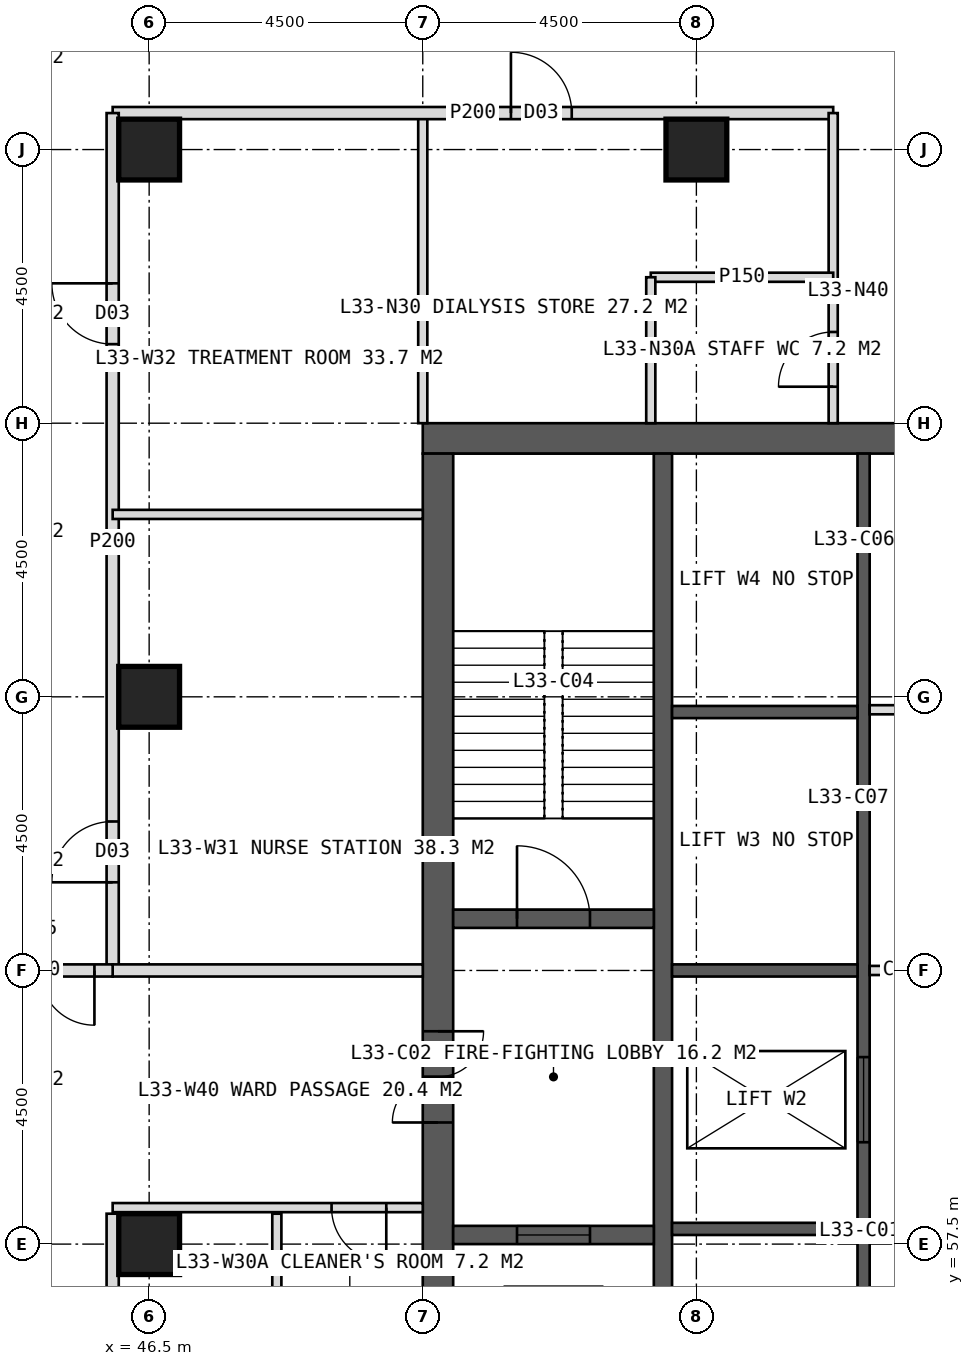
"""IFC4 building model, lengths in metres.
Left out: names, types, materials, properties, quantities, classifications, styles, units other than length and angle.
Written with IfcOpenShell. Run it as: python <this file> out.ifc"""

import sys

from ifc_helpers import new_model, si_unit, direction, frame, frame_2d, origin, origin_2d, place, context, subcontext, project, spatial, rectangle, hollow_rectangle, extrude, element, fill, save


model = new_model("IFC4")
c1 = context("Model", 3, precision=1e-05, world=origin(), true_north=direction((0.0, 1.0)))
c2 = subcontext(c1, "Body", "Model", "MODEL_VIEW")
j1 = project(units=[si_unit("LENGTHUNIT", "METRE"), si_unit("PLANEANGLEUNIT", "RADIAN")], contexts=[c1])
p1 = place(None, origin())
s1 = spatial("IfcSite", under=j1, at=p1, CompositionType="ELEMENT")
p2 = place(p1, origin())
s2 = spatial("IfcBuilding", under=s1, at=p2, CompositionType="ELEMENT")
p3 = place(p2, frame((0.0, 0.0, 140.0)))
s3 = spatial("IfcBuildingStorey", under=s2, at=p3, CompositionType="ELEMENT", Elevation=140.0)
p4 = place(p3, frame((51.0, 70.75, 0.0), z_axis=(0.0, 0.0, 1.0), x_axis=(1.0, 0.0, 0.0)))
e1 = element("IfcWall", 1, at=p4, inside=s3, PredefinedType="SHEAR", context=c2, shape_type="SweptSolid", body=[
    extrude(rectangle(XDim=18.0, YDim=0.5, at=frame_2d((9.0, 0.0))), origin(), (0.0, 0.0, 1.0), 4.0),
])
p5 = place(p4, frame((8.1, 0.0, 0.0)))
e2 = element("IfcOpeningElement", 2, at=p5, cuts=e1, PredefinedType="OPENING", context=c2, shape_type="SweptSolid", body=[
    extrude(rectangle(XDim=1.8, YDim=2.2, at=frame_2d((0.9, 1.1))), frame((0.0, 0.26, 0.0), z_axis=(0.0, -1.0, 0.0), x_axis=(1.0, 0.0, 0.0)), (0.0, 0.0, 1.0), 0.52),
])
p6 = place(p3, frame((51.25, 53.5, 0.0), z_axis=(0.0, 0.0, 1.0), x_axis=(0.0, 1.0, 0.0)))
e3 = element("IfcWall", 3, at=p6, inside=s3, PredefinedType="SHEAR", context=c2, shape_type="SweptSolid", body=[
    extrude(rectangle(XDim=17.0, YDim=0.5, at=frame_2d((8.5, 0.0))), origin(), (0.0, 0.0, 1.0), 4.0),
])
p7 = place(p6, frame((6.0, 0.0, 0.0)))
e4 = element("IfcOpeningElement", 4, at=p7, cuts=e3, PredefinedType="OPENING", context=c2, shape_type="SweptSolid", body=[
    extrude(rectangle(XDim=1.5, YDim=2.2, at=frame_2d((0.75, 1.1))), frame((0.0, 0.26, 0.0), z_axis=(0.0, -1.0, 0.0), x_axis=(1.0, 0.0, 0.0)), (0.0, 0.0, 1.0), 0.52),
])
p8 = place(p3, frame((54.95, 53.5, 0.0), z_axis=(0.0, 0.0, 1.0), x_axis=(0.0, 1.0, 0.0)))
e5 = element("IfcWall", 5, at=p8, inside=s3, PredefinedType="SHEAR", context=c2, shape_type="SweptSolid", body=[
    extrude(rectangle(XDim=17.0, YDim=0.3, at=frame_2d((8.5, 0.0))), origin(), (0.0, 0.0, 1.0), 4.0),
])
p9 = place(p3, frame((58.25, 53.5, 0.0), z_axis=(0.0, 0.0, 1.0), x_axis=(0.0, 1.0, 0.0)))
e6 = element("IfcWall", 6, at=p9, inside=s3, PredefinedType="SHEAR", context=c2, shape_type="SweptSolid", body=[
    extrude(rectangle(XDim=17.0, YDim=0.2, at=frame_2d((8.5, 0.0))), origin(), (0.0, 0.0, 1.0), 4.0),
])
p10 = place(p9, frame((1.375, 0.0, 0.0)))
e7 = element("IfcOpeningElement", 7, at=p10, cuts=e6, PredefinedType="OPENING", context=c2, shape_type="SweptSolid", body=[
    extrude(rectangle(XDim=1.4, YDim=2.2, at=frame_2d((0.7, 1.1))), frame((0.0, 0.11, 0.0), z_axis=(0.0, -1.0, 0.0), x_axis=(1.0, 0.0, 0.0)), (0.0, 0.0, 1.0), 0.22),
])
p11 = place(p9, frame((5.675, 0.0, 0.0)))
e8 = element("IfcOpeningElement", 8, at=p11, cuts=e6, PredefinedType="OPENING", context=c2, shape_type="SweptSolid", body=[
    extrude(rectangle(XDim=1.4, YDim=2.2, at=frame_2d((0.7, 1.1))), frame((0.0, 0.11, 0.0), z_axis=(0.0, -1.0, 0.0), x_axis=(1.0, 0.0, 0.0)), (0.0, 0.0, 1.0), 0.22),
])
for number, where, z_axis, x_axis in (
    (9, (55.1, 57.75, 0.0), (0.0, 0.0, 1.0), (1.0, 0.0, 0.0)),
    (10, (55.1, 62.0, 0.0), (0.0, 0.0, 1.0), (1.0, 0.0, 0.0)),
    (11, (55.1, 66.25, 0.0), (0.0, 0.0, 1.0), (1.0, 0.0, 0.0)),
):
    element("IfcWall", number, at=place(p3, frame(where, z_axis=z_axis, x_axis=x_axis)), inside=s3, PredefinedType="SHEAR", context=c2, shape_type="SweptSolid", body=[
        extrude(rectangle(XDim=3.05, YDim=0.2, at=frame_2d((1.525, 0.0))), origin(), (0.0, 0.0, 1.0), 4.0),
    ])
p12 = place(p3, frame((51.5, 62.85, 0.0), z_axis=(0.0, 0.0, 1.0), x_axis=(1.0, 0.0, 0.0)))
e12 = element("IfcWall", 12, at=p12, inside=s3, PredefinedType="SHEAR", context=c2, shape_type="SweptSolid", body=[
    extrude(rectangle(XDim=3.3, YDim=0.3, at=frame_2d((1.65, 0.0))), origin(), (0.0, 0.0, 1.0), 4.0),
])
p13 = place(p12, frame((1.05, 0.0, 0.0)))
e13 = element("IfcOpeningElement", 13, at=p13, cuts=e12, PredefinedType="OPENING", context=c2, shape_type="SweptSolid", body=[
    extrude(rectangle(XDim=1.2, YDim=2.1, at=frame_2d((0.6, 1.05))), frame((0.0, 0.16, 0.0), z_axis=(0.0, -1.0, 0.0), x_axis=(1.0, 0.0, 0.0)), (0.0, 0.0, 1.0), 0.32),
])
p14 = place(p3, frame((51.5, 57.65, 0.0), z_axis=(0.0, 0.0, 1.0), x_axis=(1.0, 0.0, 0.0)))
e14 = element("IfcWall", 14, at=p14, inside=s3, PredefinedType="SHEAR", context=c2, shape_type="SweptSolid", body=[
    extrude(rectangle(XDim=3.3, YDim=0.3, at=frame_2d((1.65, 0.0))), origin(), (0.0, 0.0, 1.0), 4.0),
])
p15 = place(p14, frame((1.05, 0.0, 0.0)))
e15 = element("IfcOpeningElement", 15, at=p15, cuts=e14, PredefinedType="OPENING", context=c2, shape_type="SweptSolid", body=[
    extrude(rectangle(XDim=1.2, YDim=2.2, at=frame_2d((0.6, 1.1))), frame((0.0, 0.16, 0.0), z_axis=(0.0, -1.0, 0.0), x_axis=(1.0, 0.0, 0.0)), (0.0, 0.0, 1.0), 0.32),
])
for number, where, z_axis, x_axis in (
    (16, (46.5, 75.5, 0.0), (0.0, 0.0, 1.0), (1.0, 0.0, 0.0)),
    (17, (55.5, 75.5, 0.0), (0.0, 0.0, 1.0), (1.0, 0.0, 0.0)),
    (18, (46.5, 57.5, 0.0), (0.0, 0.0, 1.0), (1.0, 0.0, 0.0)),
    (19, (46.5, 66.5, 0.0), (0.0, 0.0, 1.0), (1.0, 0.0, 0.0)),
):
    element("IfcColumn", number, at=place(p3, frame(where, z_axis=z_axis, x_axis=x_axis)), inside=s3, PredefinedType="COLUMN", context=c2, shape_type="SweptSolid", body=[
        extrude(hollow_rectangle(XDim=1.0, YDim=1.0, WallThickness=0.1, at=origin_2d()), origin(), (0.0, 0.0, 1.0), 4.0),
    ])
p16 = place(p3, frame((51.0, 71.0, 0.0), z_axis=(0.0, 0.0, 1.0), x_axis=(0.0, 1.0, 0.0)))
e20 = element("IfcWall", 20, at=p16, inside=s3, PredefinedType="PARTITIONING", context=c2, shape_type="SweptSolid", body=[
    extrude(rectangle(XDim=5.1, YDim=0.15, at=frame_2d((2.55, 0.0))), origin(), (0.0, 0.0, 1.0), 3.75),
])
p17 = place(p3, frame((45.9, 76.1, 0.0), z_axis=(0.0, 0.0, 1.0), x_axis=(1.0, 0.0, 0.0)))
e21 = element("IfcWall", 21, at=p17, inside=s3, PredefinedType="PARTITIONING", context=c2, shape_type="SweptSolid", body=[
    extrude(rectangle(XDim=11.85, YDim=0.2, at=frame_2d((5.925, 0.0))), origin(), (0.0, 0.0, 1.0), 3.75),
])
p18 = place(p17, frame((6.55, 0.0, 0.0)))
e22 = element("IfcOpeningElement", 22, at=p18, cuts=e21, PredefinedType="OPENING", context=c2, shape_type="SweptSolid", body=[
    extrude(rectangle(XDim=1.0, YDim=2.1, at=frame_2d((0.5, 1.05))), frame((0.0, 0.11, 0.0), z_axis=(0.0, -1.0, 0.0), x_axis=(1.0, 0.0, 0.0)), (0.0, 0.0, 1.0), 0.22),
])
p19 = place(p3, frame((57.75, 71.0, 0.0), z_axis=(0.0, 0.0, 1.0), x_axis=(0.0, 1.0, 0.0)))
e23 = element("IfcWall", 23, at=p19, inside=s3, PredefinedType="PARTITIONING", context=c2, shape_type="SweptSolid", body=[
    extrude(rectangle(XDim=5.1, YDim=0.15, at=frame_2d((2.55, 0.0))), origin(), (0.0, 0.0, 1.0), 3.75),
])
p20 = place(p19, frame((0.6, 0.0, 0.0)))
e24 = element("IfcOpeningElement", 24, at=p20, cuts=e23, PredefinedType="OPENING", context=c2, shape_type="SweptSolid", body=[
    extrude(rectangle(XDim=0.9, YDim=2.1, at=frame_2d((0.45, 1.05))), frame((0.0, 0.085, 0.0), z_axis=(0.0, -1.0, 0.0), x_axis=(1.0, 0.0, 0.0)), (0.0, 0.0, 1.0), 0.17),
])
p21 = place(p3, frame((54.75, 73.4, 0.0), z_axis=(0.0, 0.0, 1.0), x_axis=(1.0, 0.0, 0.0)))
e25 = element("IfcWall", 25, at=p21, inside=s3, PredefinedType="PARTITIONING", context=c2, shape_type="SweptSolid", body=[
    extrude(rectangle(XDim=3.0, YDim=0.15, at=frame_2d((1.5, 0.0))), origin(), (0.0, 0.0, 1.0), 3.75),
])
p22 = place(p3, frame((54.75, 71.0, 0.0), z_axis=(0.0, 0.0, 1.0), x_axis=(0.0, 1.0, 0.0)))
e26 = element("IfcWall", 26, at=p22, inside=s3, PredefinedType="PARTITIONING", context=c2, shape_type="SweptSolid", body=[
    extrude(rectangle(XDim=2.4, YDim=0.15, at=frame_2d((1.2, 0.0))), origin(), (0.0, 0.0, 1.0), 3.75),
])
p23 = place(p3, frame((45.9, 47.9, 0.0), z_axis=(0.0, 0.0, 1.0), x_axis=(0.0, 1.0, 0.0)))
e27 = element("IfcWall", 27, at=p23, inside=s3, PredefinedType="PARTITIONING", context=c2, shape_type="SweptSolid", body=[
    extrude(rectangle(XDim=10.1, YDim=0.2, at=frame_2d((5.05, 0.0))), origin(), (0.0, 0.0, 1.0), 3.75),
])
p24 = place(p23, frame((7.1, 0.0, 0.0)))
e28 = element("IfcOpeningElement", 28, at=p24, cuts=e27, PredefinedType="OPENING", context=c2, shape_type="SweptSolid", body=[
    extrude(rectangle(XDim=1.0, YDim=2.1, at=frame_2d((0.5, 1.05))), frame((0.0, 0.11, 0.0), z_axis=(0.0, -1.0, 0.0), x_axis=(1.0, 0.0, 0.0)), (0.0, 0.0, 1.0), 0.22),
])
p25 = place(p3, frame((45.9, 62.0, 0.0), z_axis=(0.0, 0.0, 1.0), x_axis=(0.0, 1.0, 0.0)))
e29 = element("IfcWall", 29, at=p25, inside=s3, PredefinedType="PARTITIONING", context=c2, shape_type="SweptSolid", body=[
    extrude(rectangle(XDim=14.1, YDim=0.2, at=frame_2d((7.05, 0.0))), origin(), (0.0, 0.0, 1.0), 3.75),
])
p26 = place(p25, frame((1.45, 0.0, 0.0)))
e30 = element("IfcOpeningElement", 30, at=p26, cuts=e29, PredefinedType="OPENING", context=c2, shape_type="SweptSolid", body=[
    extrude(rectangle(XDim=1.0, YDim=2.1, at=frame_2d((0.5, 1.05))), frame((0.0, 0.11, 0.0), z_axis=(0.0, -1.0, 0.0), x_axis=(1.0, 0.0, 0.0)), (0.0, 0.0, 1.0), 0.22),
])
p27 = place(p25, frame((10.3, 0.0, 0.0)))
e31 = element("IfcOpeningElement", 31, at=p27, cuts=e29, PredefinedType="OPENING", context=c2, shape_type="SweptSolid", body=[
    extrude(rectangle(XDim=1.0, YDim=2.1, at=frame_2d((0.5, 1.05))), frame((0.0, 0.11, 0.0), z_axis=(0.0, -1.0, 0.0), x_axis=(1.0, 0.0, 0.0)), (0.0, 0.0, 1.0), 0.22),
])
p28 = place(p3, frame((51.0, 58.1, 0.0), z_axis=(0.0, 0.0, 1.0), x_axis=(-1.0, 0.0, 0.0)))
e32 = element("IfcWall", 32, at=p28, inside=s3, PredefinedType="PARTITIONING", context=c2, shape_type="SweptSolid", body=[
    extrude(rectangle(XDim=5.1, YDim=0.15, at=frame_2d((2.55, 0.0))), origin(), (0.0, 0.0, 1.0), 3.75),
])
p29 = place(p28, frame((0.6, 0.0, 0.0)))
e33 = element("IfcOpeningElement", 33, at=p29, cuts=e32, PredefinedType="OPENING", context=c2, shape_type="SweptSolid", body=[
    extrude(rectangle(XDim=0.9, YDim=2.1, at=frame_2d((0.45, 1.05))), frame((0.0, 0.085, 0.0), z_axis=(0.0, -1.0, 0.0), x_axis=(1.0, 0.0, 0.0)), (0.0, 0.0, 1.0), 0.17),
])
p30 = place(p3, frame((51.0, 62.0, 0.0), z_axis=(0.0, 0.0, 1.0), x_axis=(-1.0, 0.0, 0.0)))
e34 = element("IfcWall", 34, at=p30, inside=s3, PredefinedType="SOLIDWALL", context=c2, shape_type="SweptSolid", body=[
    extrude(rectangle(XDim=5.1, YDim=0.2, at=frame_2d((2.55, 0.0))), origin(), (0.0, 0.0, 1.0), 2.95),
])
p31 = place(p3, frame((51.0, 69.5, 0.0), z_axis=(0.0, 0.0, 1.0), x_axis=(-1.0, 0.0, 0.0)))
e35 = element("IfcWall", 35, at=p31, inside=s3, PredefinedType="PARTITIONING", context=c2, shape_type="SweptSolid", body=[
    extrude(rectangle(XDim=5.1, YDim=0.15, at=frame_2d((2.55, 0.0))), origin(), (0.0, 0.0, 1.0), 3.75),
])
p32 = place(p3, frame((48.6, 55.0, 0.0), z_axis=(0.0, 0.0, 1.0), x_axis=(0.0, 1.0, 0.0)))
e36 = element("IfcWall", 36, at=p32, inside=s3, PredefinedType="PARTITIONING", context=c2, shape_type="SweptSolid", body=[
    extrude(rectangle(XDim=3.0, YDim=0.15, at=frame_2d((1.5, 0.0))), origin(), (0.0, 0.0, 1.0), 3.75),
])
p33 = place(p3, frame((45.9, 62.0, 0.0), z_axis=(0.0, 0.0, 1.0), x_axis=(-1.0, 0.0, 0.0)))
e37 = element("IfcWall", 37, at=p33, inside=s3, PredefinedType="SOLIDWALL", context=c2, shape_type="SweptSolid", body=[
    extrude(rectangle(XDim=2.7, YDim=0.2, at=frame_2d((1.35, 0.0))), origin(), (0.0, 0.0, 1.0), 2.95),
])
p34 = place(p33, frame((0.3, 0.0, 0.0)))
e38 = element("IfcOpeningElement", 38, at=p34, cuts=e37, PredefinedType="OPENING", context=c2, shape_type="SweptSolid", body=[
    extrude(rectangle(XDim=1.8, YDim=2.2, at=frame_2d((0.9, 1.1))), frame((0.0, 0.11, 0.0), z_axis=(0.0, -1.0, 0.0), x_axis=(1.0, 0.0, 0.0)), (0.0, 0.0, 1.0), 0.22),
])
p35 = place(p3, frame((58.35, 62.0, 0.0), z_axis=(0.0, 0.0, 1.0), x_axis=(1.0, 0.0, 0.0)))
e39 = element("IfcWall", 39, at=p35, inside=s3, PredefinedType="PARTITIONING", context=c2, shape_type="SweptSolid", body=[
    extrude(rectangle(XDim=3.3, YDim=0.15, at=frame_2d((1.65, 0.0))), origin(), (0.0, 0.0, 1.0), 3.75),
])
p36 = place(p35, frame((1.15, 0.0, 0.0)))
e40 = element("IfcOpeningElement", 40, at=p36, cuts=e39, PredefinedType="OPENING", context=c2, shape_type="SweptSolid", body=[
    extrude(rectangle(XDim=1.0, YDim=2.1, at=frame_2d((0.5, 1.05))), frame((0.0, 0.085, 0.0), z_axis=(0.0, -1.0, 0.0), x_axis=(1.0, 0.0, 0.0)), (0.0, 0.0, 1.0), 0.17),
])
p37 = place(p3, frame((58.35, 66.288, 0.0), z_axis=(0.0, 0.0, 1.0), x_axis=(1.0, 0.0, 0.0)))
e41 = element("IfcWall", 41, at=p37, inside=s3, PredefinedType="PARTITIONING", context=c2, shape_type="SweptSolid", body=[
    extrude(rectangle(XDim=3.3, YDim=0.15, at=frame_2d((1.65, 0.0))), origin(), (0.0, 0.0, 1.0), 3.75),
])
p38 = place(p20, origin())
e42 = element("IfcDoor", 42, at=p38, inside=s3, OperationType="SINGLE_SWING_LEFT", PredefinedType="DOOR", context=c2, shape_type="SweptSolid", body=[
    extrude(rectangle(XDim=0.9, YDim=2.1, at=frame_2d((0.45, 1.05))), frame((0.0, 0.025, 0.0), z_axis=(0.0, -1.0, 0.0), x_axis=(1.0, 0.0, 0.0)), (0.0, 0.0, 1.0), 0.05),
])
fill(e24, e42)
p39 = place(p18, origin())
e43 = element("IfcDoor", 43, at=p39, inside=s3, OperationType="SINGLE_SWING_LEFT", PredefinedType="DOOR", context=c2, shape_type="SweptSolid", body=[
    extrude(rectangle(XDim=1.0, YDim=2.1, at=frame_2d((0.5, 1.05))), frame((0.0, 0.025, 0.0), z_axis=(0.0, -1.0, 0.0), x_axis=(1.0, 0.0, 0.0)), (0.0, 0.0, 1.0), 0.05),
])
fill(e22, e43)
p40 = place(p29, origin())
e44 = element("IfcDoor", 44, at=p40, inside=s3, OperationType="SINGLE_SWING_LEFT", PredefinedType="DOOR", context=c2, shape_type="SweptSolid", body=[
    extrude(rectangle(XDim=0.9, YDim=2.1, at=frame_2d((0.45, 1.05))), frame((0.0, 0.025, 0.0), z_axis=(0.0, -1.0, 0.0), x_axis=(1.0, 0.0, 0.0)), (0.0, 0.0, 1.0), 0.05),
])
fill(e33, e44)
p41 = place(p26, origin())
e45 = element("IfcDoor", 45, at=p41, inside=s3, OperationType="SINGLE_SWING_LEFT", PredefinedType="DOOR", context=c2, shape_type="SweptSolid", body=[
    extrude(rectangle(XDim=1.0, YDim=2.1, at=frame_2d((0.5, 1.05))), frame((0.0, 0.025, 0.0), z_axis=(0.0, -1.0, 0.0), x_axis=(1.0, 0.0, 0.0)), (0.0, 0.0, 1.0), 0.05),
])
fill(e30, e45)
p42 = place(p27, origin())
e46 = element("IfcDoor", 46, at=p42, inside=s3, OperationType="SINGLE_SWING_RIGHT", PredefinedType="DOOR", context=c2, shape_type="SweptSolid", body=[
    extrude(rectangle(XDim=1.0, YDim=2.1, at=frame_2d((0.5, 1.05))), frame((0.0, 0.025, 0.0), z_axis=(0.0, -1.0, 0.0), x_axis=(1.0, 0.0, 0.0)), (0.0, 0.0, 1.0), 0.05),
])
fill(e31, e46)
p43 = place(p34, origin())
e47 = element("IfcDoor", 47, at=p43, inside=s3, OperationType="DOUBLE_DOOR_DOUBLE_SWING", PredefinedType="DOOR", context=c2, shape_type="SweptSolid", body=[
    extrude(rectangle(XDim=1.8, YDim=2.2, at=frame_2d((0.9, 1.1))), frame((0.0, 0.025, 0.0), z_axis=(0.0, -1.0, 0.0), x_axis=(1.0, 0.0, 0.0)), (0.0, 0.0, 1.0), 0.05),
])
fill(e38, e47)
p44 = place(p7, origin())
e48 = element("IfcDoor", 48, at=p44, inside=s3, OperationType="DOUBLE_DOOR_SINGLE_SWING", PredefinedType="DOOR", context=c2, shape_type="SweptSolid", body=[
    extrude(rectangle(XDim=1.5, YDim=2.2, at=frame_2d((0.75, 1.1))), frame((0.0, 0.025, 0.0), z_axis=(0.0, -1.0, 0.0), x_axis=(1.0, 0.0, 0.0)), (0.0, 0.0, 1.0), 0.05),
])
fill(e4, e48)
p45 = place(p13, origin())
e49 = element("IfcDoor", 49, at=p45, inside=s3, OperationType="SINGLE_SWING_LEFT", PredefinedType="DOOR", context=c2, shape_type="SweptSolid", body=[
    extrude(rectangle(XDim=1.2, YDim=2.1, at=frame_2d((0.6, 1.05))), frame((0.0, 0.025, 0.0), z_axis=(0.0, -1.0, 0.0), x_axis=(1.0, 0.0, 0.0)), (0.0, 0.0, 1.0), 0.05),
])
fill(e13, e49)
p46 = place(p15, origin())
e50 = element("IfcDoor", 50, at=p46, inside=s3, OperationType="SLIDING_TO_LEFT", PredefinedType="DOOR", context=c2, shape_type="SweptSolid", body=[
    extrude(rectangle(XDim=1.2, YDim=2.2, at=frame_2d((0.6, 1.1))), frame((0.0, 0.025, 0.0), z_axis=(0.0, -1.0, 0.0), x_axis=(1.0, 0.0, 0.0)), (0.0, 0.0, 1.0), 0.05),
])
fill(e15, e50)
p47 = place(p11, origin())
e51 = element("IfcDoor", 51, at=p47, inside=s3, OperationType="SLIDING_TO_LEFT", PredefinedType="DOOR", context=c2, shape_type="SweptSolid", body=[
    extrude(rectangle(XDim=1.4, YDim=2.2, at=frame_2d((0.7, 1.1))), frame((0.0, 0.025, 0.0), z_axis=(0.0, -1.0, 0.0), x_axis=(1.0, 0.0, 0.0)), (0.0, 0.0, 1.0), 0.05),
])
fill(e8, e51)
save(model, sys.argv[1])
